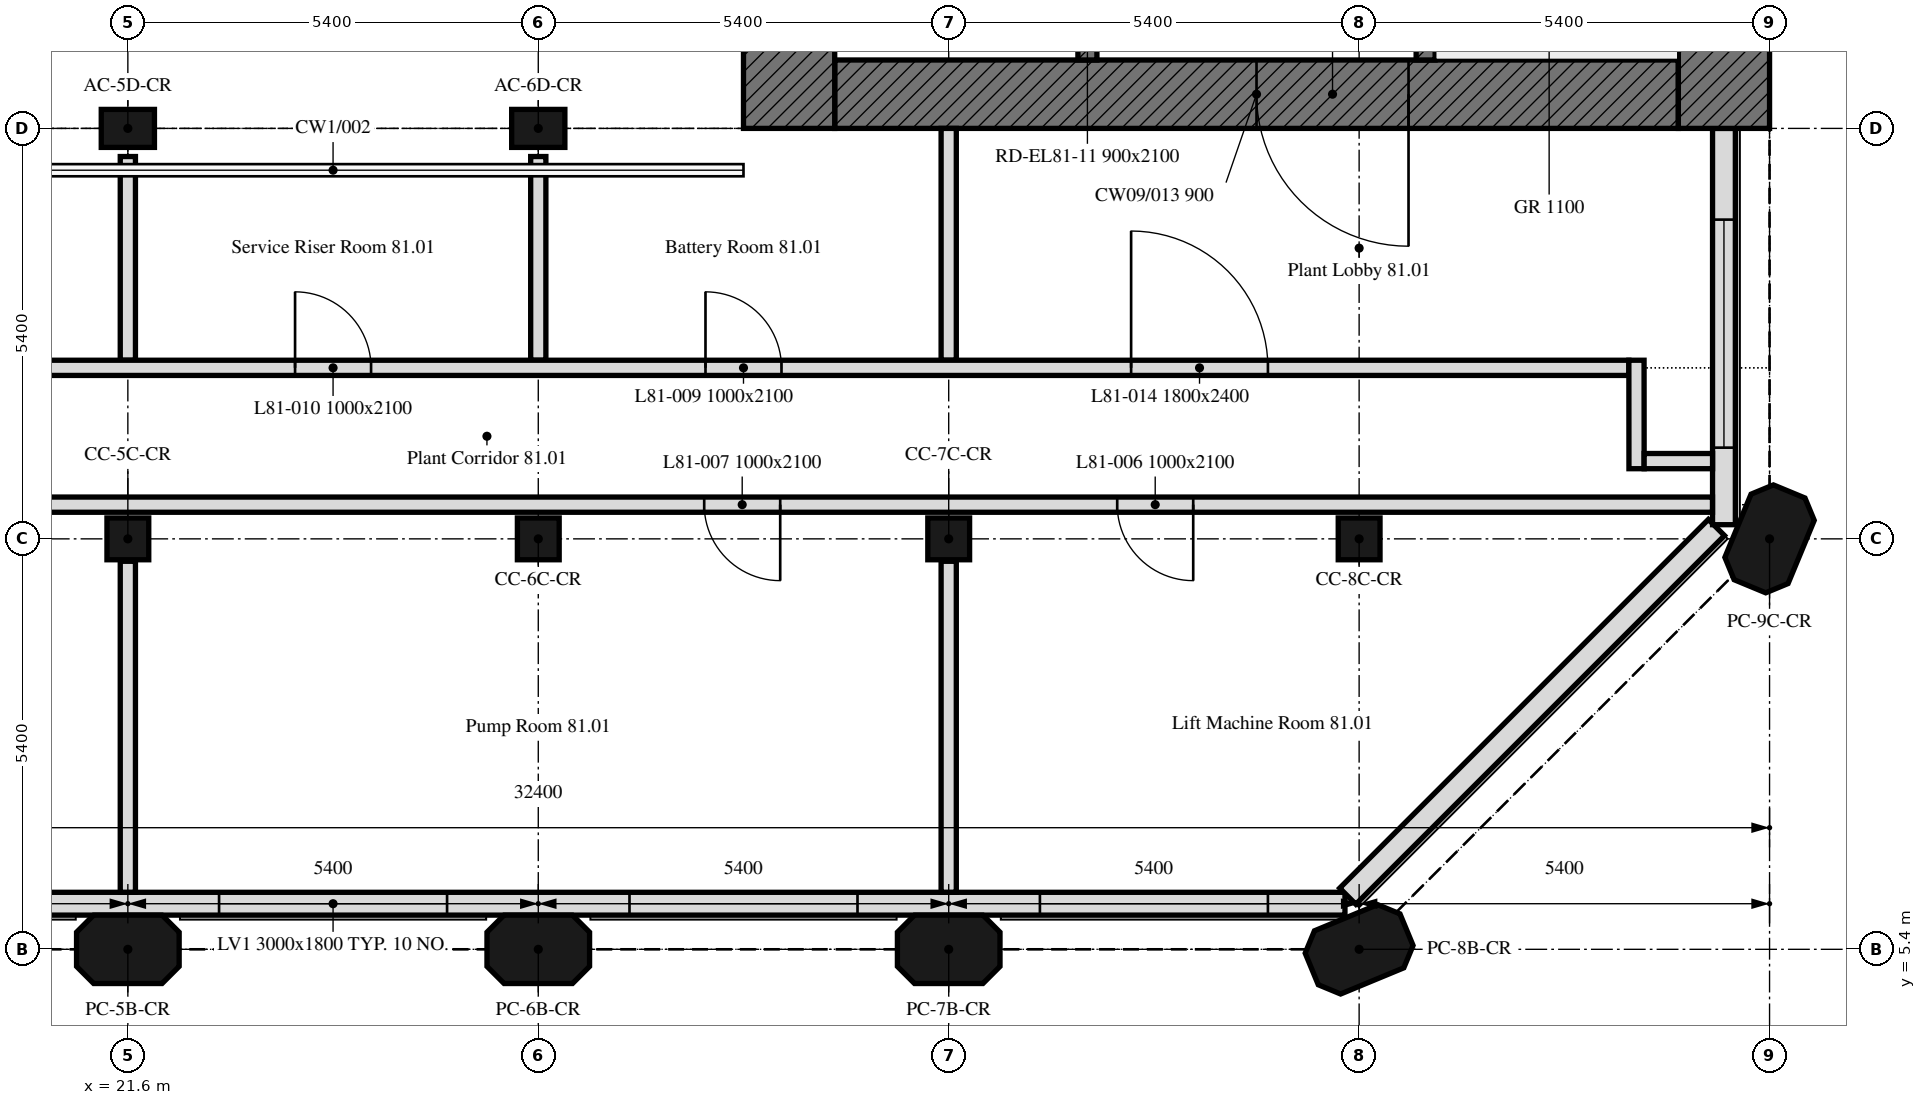
"""IFC4 building model, lengths in metres.
Left out: names, types, materials, properties, quantities, classifications, styles, units other than length and angle.
Written with IfcOpenShell. Run it as: python <this file> out.ifc"""

import sys

from ifc_helpers import new_model, si_unit, direction, frame, frame_2d, origin, origin_2d, place, context, subcontext, project, spatial, polyline, rectangle, outline, extrude, element, fill, save


model = new_model("IFC4")
c1 = context("Model", 3, precision=1e-05, world=origin(), true_north=direction((0.0, 1.0)))
c2 = subcontext(c1, "Body", "Model", "MODEL_VIEW")
j1 = project(units=[si_unit("LENGTHUNIT", "METRE"), si_unit("PLANEANGLEUNIT", "RADIAN")], contexts=[c1])
p1 = place(None, origin())
s1 = spatial("IfcSite", under=j1, at=p1, CompositionType="ELEMENT")
p2 = place(p1, origin())
s2 = spatial("IfcBuilding", under=s1, at=p2, CompositionType="ELEMENT")
p3 = place(p2, frame((0.0, 0.0, 326.2)))
s3 = spatial("IfcBuildingStorey", under=s2, at=p3, CompositionType="ELEMENT", Elevation=326.2)
for number, where, z_axis, x_axis in (
    (1, (21.6, 5.4, 0.0), (0.0, 0.0, 1.0), (1.0, 0.0, 0.0)),
    (2, (27.0, 5.4, 0.0), (0.0, 0.0, 1.0), (1.0, 0.0, 0.0)),
    (3, (32.4, 5.4, 0.0), (0.0, 0.0, 1.0), (1.0, 0.0, 0.0)),
    (4, (37.8, 5.4, 0.0), (0.0, 0.0, 1.0), (0.924, 0.383, 0.0)),
):
    element("IfcColumn", number, at=place(p3, frame(where, z_axis=z_axis, x_axis=x_axis)), inside=s3, PredefinedType="COLUMN", context=c2, shape_type="SweptSolid", body=[
        extrude(outline(polyline([(-0.45, -0.45), (0.45, -0.45), (0.675, -0.225), (0.675, 0.225), (0.45, 0.45), (-0.45, 0.45), (-0.675, 0.225), (-0.675, -0.225), (-0.45, -0.45)])), origin(), (0.0, 0.0, 1.0), 4.2),
    ])
for number, where, z_axis, x_axis in (
    (5, (21.6, 10.8, 0.0), (0.0, 0.0, 1.0), (1.0, 0.0, 0.0)),
    (6, (27.0, 10.8, 0.0), (0.0, 0.0, 1.0), (1.0, 0.0, 0.0)),
    (7, (32.4, 10.8, 0.0), (0.0, 0.0, 1.0), (1.0, 0.0, 0.0)),
    (8, (37.8, 10.8, 0.0), (0.0, 0.0, 1.0), (1.0, 0.0, 0.0)),
):
    element("IfcColumn", number, at=place(p3, frame(where, z_axis=z_axis, x_axis=x_axis)), inside=s3, PredefinedType="COLUMN", context=c2, shape_type="SweptSolid", body=[
        extrude(rectangle(XDim=0.55, YDim=0.55, at=origin_2d()), origin(), (0.0, 0.0, 1.0), 4.2),
    ])
p4 = place(p3, frame((43.2, 10.8, 0.0), z_axis=(0.0, 0.0, 1.0), x_axis=(0.382683432365, 0.923879532511, 0.0)))
e9 = element("IfcColumn", 9, at=p4, inside=s3, PredefinedType="COLUMN", context=c2, shape_type="SweptSolid", body=[
    extrude(outline(polyline([(-0.45, -0.45), (0.45, -0.45), (0.675, -0.225), (0.675, 0.225), (0.45, 0.45), (-0.45, 0.45), (-0.675, 0.225), (-0.675, -0.225), (-0.45, -0.45)])), origin(), (0.0, 0.0, 1.0), 4.2),
])
for number, where, z_axis, x_axis in (
    (10, (21.6, 16.2, 0.0), (0.0, 0.0, 1.0), (1.0, 0.0, 0.0)),
    (11, (27.0, 16.2, 0.0), (0.0, 0.0, 1.0), (1.0, 0.0, 0.0)),
):
    element("IfcColumn", number, at=place(p3, frame(where, z_axis=z_axis, x_axis=x_axis)), inside=s3, PredefinedType="COLUMN", context=c2, shape_type="SweptSolid", body=[
        extrude(rectangle(XDim=0.7, YDim=0.5, at=origin_2d()), origin(), (0.0, 0.0, 1.0), 4.2),
    ])
p5 = place(p3, frame((19.575, 6.0, 0.0), z_axis=(0.0, 0.0, 1.0), x_axis=(1.0, 0.0, 0.0)))
e12 = element("IfcWall", 12, at=p5, inside=s3, PredefinedType="SOLIDWALL", context=c2, shape_type="SweptSolid", body=[
    extrude(outline(polyline([(0.0, 0.0), (18.039, 0.0), (18.039, 4.2), (17.457, 4.2), (16.875, 4.2), (16.293, 4.2), (15.711, 4.2), (15.129, 4.2), (14.547, 4.2), (13.965, 4.2), (13.384, 4.2), (12.802, 4.2), (12.22, 4.2), (11.638, 4.2), (11.056, 4.2), (10.474, 4.2), (9.892, 4.2), (9.31, 4.2), (8.728, 4.2), (8.146, 4.2), (7.565, 4.2), (6.983, 4.2), (6.401, 4.2), (5.819, 4.2), (5.237, 4.2), (4.655, 4.2), (4.073, 4.2), (3.491, 4.2), (2.909, 4.2), (2.328, 4.2), (1.746, 4.2), (1.164, 4.2), (0.582, 4.2), (0.0, 4.2), (0.0, 0.0)])), frame((0.0, 0.15, 0.0), z_axis=(0.0, -1.0, 0.0), x_axis=(1.0, 0.0, 0.0)), (0.0, 0.0, 1.0), 0.3),
])
p6 = place(p5, frame((3.225, 0.0, 0.6)))
e13 = element("IfcOpeningElement", 13, at=p6, cuts=e12, PredefinedType="OPENING", context=c2, shape_type="SweptSolid", body=[
    extrude(rectangle(XDim=3.0, YDim=1.8, at=frame_2d((1.5, 0.9))), frame((0.0, 0.16, 0.0), z_axis=(0.0, -1.0, 0.0), x_axis=(1.0, 0.0, 0.0)), (0.0, 0.0, 1.0), 0.32),
])
p7 = place(p5, frame((8.625, 0.0, 0.6)))
e14 = element("IfcOpeningElement", 14, at=p7, cuts=e12, PredefinedType="OPENING", context=c2, shape_type="SweptSolid", body=[
    extrude(rectangle(XDim=3.0, YDim=1.8, at=frame_2d((1.5, 0.9))), frame((0.0, 0.16, 0.0), z_axis=(0.0, -1.0, 0.0), x_axis=(1.0, 0.0, 0.0)), (0.0, 0.0, 1.0), 0.32),
])
p8 = place(p5, frame((14.025, 0.0, 0.6)))
e15 = element("IfcOpeningElement", 15, at=p8, cuts=e12, PredefinedType="OPENING", context=c2, shape_type="SweptSolid", body=[
    extrude(rectangle(XDim=3.0, YDim=1.8, at=frame_2d((1.5, 0.9))), frame((0.0, 0.16, 0.0), z_axis=(0.0, -1.0, 0.0), x_axis=(1.0, 0.0, 0.0)), (0.0, 0.0, 1.0), 0.32),
])
p9 = place(p3, frame((37.65, 6.099, 0.0), z_axis=(0.0, 0.0, 1.0), x_axis=(0.707106781187, 0.707106781187, 0.0)))
e16 = element("IfcWall", 16, at=p9, inside=s3, PredefinedType="SOLIDWALL", context=c2, shape_type="SweptSolid", body=[
    extrude(outline(polyline([(0.0, 0.0), (6.86, 0.0), (6.86, 4.2), (6.288, 4.2), (5.716, 4.2), (5.145, 4.2), (4.573, 4.2), (4.001, 4.2), (3.43, 4.2), (2.858, 4.2), (2.287, 4.2), (1.715, 4.2), (1.143, 4.2), (0.572, 4.2), (0.0, 4.2), (0.0, 0.0)])), frame((0.0, 0.15, 0.0), z_axis=(0.0, -1.0, 0.0), x_axis=(1.0, 0.0, 0.0)), (0.0, 0.0, 1.0), 0.3),
])
p10 = place(p3, frame((42.6, 10.986, 0.0), z_axis=(0.0, 0.0, 1.0), x_axis=(0.0, 1.0, 0.0)))
e17 = element("IfcWall", 17, at=p10, inside=s3, PredefinedType="SOLIDWALL", context=c2, shape_type="SweptSolid", body=[
    extrude(outline(polyline([(0.0, 0.0), (5.214, 0.0), (5.214, 4.2), (4.634, 4.2), (4.055, 4.2), (3.476, 4.2), (2.896, 4.2), (2.317, 4.2), (1.738, 4.2), (1.159, 4.2), (0.579, 4.2), (0.0, 4.2), (0.0, 0.0)])), frame((0.0, 0.15, 0.0), z_axis=(0.0, -1.0, 0.0), x_axis=(1.0, 0.0, 0.0)), (0.0, 0.0, 1.0), 0.3),
])
p11 = place(p10, frame((1.014, 0.0, 0.6)))
e18 = element("IfcOpeningElement", 18, at=p11, cuts=e17, PredefinedType="OPENING", context=c2, shape_type="SweptSolid", body=[
    extrude(rectangle(XDim=3.0, YDim=1.8, at=frame_2d((1.5, 0.9))), frame((0.0, 0.16, 0.0), z_axis=(0.0, -1.0, 0.0), x_axis=(1.0, 0.0, 0.0)), (0.0, 0.0, 1.0), 0.32),
])
p12 = place(p3, frame((42.0, 16.65, 0.0), z_axis=(0.0, 0.0, 1.0), x_axis=(-1.0, 0.0, 0.0)))
e19 = element("IfcWall", 19, at=p12, inside=s3, PredefinedType="SOLIDWALL", context=c2, shape_type="SweptSolid", body=[
    extrude(rectangle(XDim=11.1, YDim=0.9, at=frame_2d((5.55, 0.0))), origin(), (0.0, 0.0, 1.0), 4.2),
])
p13 = place(p12, frame((3.55, 0.0, 0.0)))
e20 = element("IfcOpeningElement", 20, at=p13, cuts=e19, PredefinedType="OPENING", context=c2, shape_type="SweptSolid", body=[
    extrude(rectangle(XDim=2.0, YDim=2.4, at=frame_2d((1.0, 1.2))), frame((0.0, 0.45, 0.0), z_axis=(0.0, -1.0, 0.0), x_axis=(1.0, 0.0, 0.0)), (0.0, 0.0, 1.0), 0.9),
])
for number, where, z_axis, x_axis in (
    (21, (42.6, 32.4, 0.0), (0.0, 0.0, 1.0), (0.0, -1.0, 0.0)),
    (22, (30.3, 16.2, 0.0), (0.0, 0.0, 1.0), (0.0, 1.0, 0.0)),
):
    element("IfcWall", number, at=place(p3, frame(where, z_axis=z_axis, x_axis=x_axis)), inside=s3, PredefinedType="SOLIDWALL", context=c2, shape_type="SweptSolid", body=[
        extrude(rectangle(XDim=16.2, YDim=1.2, at=frame_2d((8.1, 0.0))), origin(), (0.0, 0.0, 1.0), 4.2),
    ])
p14 = place(p3, frame((38.675, 17.1, 0.0), z_axis=(0.0, 0.0, 1.0), x_axis=(0.0, 1.0, 0.0)))
e23 = element("IfcWall", 23, at=p14, inside=s3, PredefinedType="SOLIDWALL", context=c2, shape_type="SweptSolid", body=[
    extrude(rectangle(XDim=14.4, YDim=0.25, at=frame_2d((7.2, 0.0))), origin(), (0.0, 0.0, 1.0), 4.2),
])
p15 = place(p14, frame((4.6, 0.0, 0.0)))
e24 = element("IfcOpeningElement", 24, at=p15, cuts=e23, PredefinedType="OPENING", context=c2, shape_type="SweptSolid", body=[
    extrude(rectangle(XDim=1.0, YDim=2.1, at=frame_2d((0.5, 1.05))), frame((0.0, 0.125, 0.0), z_axis=(0.0, -1.0, 0.0), x_axis=(1.0, 0.0, 0.0)), (0.0, 0.0, 1.0), 0.25),
])
p16 = place(p14, frame((7.062, 0.0, 0.0)))
e25 = element("IfcOpeningElement", 25, at=p16, cuts=e23, PredefinedType="OPENING", context=c2, shape_type="SweptSolid", body=[
    extrude(rectangle(XDim=1.2, YDim=2.1, at=frame_2d((0.6, 1.05))), frame((0.0, 0.125, 0.0), z_axis=(0.0, -1.0, 0.0), x_axis=(1.0, 0.0, 0.0)), (0.0, 0.0, 1.0), 0.25),
])
p17 = place(p14, frame((10.106, 0.0, 0.0)))
e26 = element("IfcOpeningElement", 26, at=p17, cuts=e23, PredefinedType="OPENING", context=c2, shape_type="SweptSolid", body=[
    extrude(rectangle(XDim=0.9, YDim=2.1, at=frame_2d((0.45, 1.05))), frame((0.0, 0.125, 0.0), z_axis=(0.0, -1.0, 0.0), x_axis=(1.0, 0.0, 0.0)), (0.0, 0.0, 1.0), 0.25),
])
p18 = place(p14, frame((12.719, 0.0, 0.0)))
e27 = element("IfcOpeningElement", 27, at=p18, cuts=e23, PredefinedType="OPENING", context=c2, shape_type="SweptSolid", body=[
    extrude(rectangle(XDim=0.9, YDim=2.1, at=frame_2d((0.45, 1.05))), frame((0.0, 0.125, 0.0), z_axis=(0.0, -1.0, 0.0), x_axis=(1.0, 0.0, 0.0)), (0.0, 0.0, 1.0), 0.25),
])
p19 = place(p3, frame((34.225, 17.1, 0.0), z_axis=(0.0, 0.0, 1.0), x_axis=(0.0, 1.0, 0.0)))
e28 = element("IfcWall", 28, at=p19, inside=s3, PredefinedType="SOLIDWALL", context=c2, shape_type="SweptSolid", body=[
    extrude(rectangle(XDim=14.4, YDim=0.25, at=frame_2d((7.2, 0.0))), origin(), (0.0, 0.0, 1.0), 4.2),
])
p20 = place(p19, frame((13.15, 0.0, 0.0)))
e29 = element("IfcOpeningElement", 29, at=p20, cuts=e28, PredefinedType="OPENING", context=c2, shape_type="SweptSolid", body=[
    extrude(rectangle(XDim=1.0, YDim=2.1, at=frame_2d((0.5, 1.05))), frame((0.0, 0.125, 0.0), z_axis=(0.0, -1.0, 0.0), x_axis=(1.0, 0.0, 0.0)), (0.0, 0.0, 1.0), 0.25),
])
p21 = place(p19, frame((0.968, 0.0, 0.0)))
e30 = element("IfcOpeningElement", 30, at=p21, cuts=e28, PredefinedType="OPENING", context=c2, shape_type="SweptSolid", body=[
    extrude(rectangle(XDim=0.9, YDim=2.1, at=frame_2d((0.45, 1.05))), frame((0.0, 0.125, 0.0), z_axis=(0.0, -1.0, 0.0), x_axis=(1.0, 0.0, 0.0)), (0.0, 0.0, 1.0), 0.25),
])
p22 = place(p19, frame((3.468, 0.0, 0.0)))
e31 = element("IfcOpeningElement", 31, at=p22, cuts=e28, PredefinedType="OPENING", context=c2, shape_type="SweptSolid", body=[
    extrude(rectangle(XDim=0.9, YDim=2.1, at=frame_2d((0.45, 1.05))), frame((0.0, 0.125, 0.0), z_axis=(0.0, -1.0, 0.0), x_axis=(1.0, 0.0, 0.0)), (0.0, 0.0, 1.0), 0.25),
])
p23 = place(p19, frame((6.175, 0.0, 0.0)))
e32 = element("IfcOpeningElement", 32, at=p23, cuts=e28, PredefinedType="OPENING", context=c2, shape_type="SweptSolid", body=[
    extrude(rectangle(XDim=0.9, YDim=2.1, at=frame_2d((0.45, 1.05))), frame((0.0, 0.125, 0.0), z_axis=(0.0, -1.0, 0.0), x_axis=(1.0, 0.0, 0.0)), (0.0, 0.0, 1.0), 0.25),
])
for number, where, z_axis, x_axis in (
    (33, (32.4, 10.505, 0.0), (0.0, 0.0, 1.0), (0.0, -1.0, 0.0)),
    (34, (21.6, 10.505, 0.0), (0.0, 0.0, 1.0), (0.0, -1.0, 0.0)),
):
    element("IfcWall", number, at=place(p3, frame(where, z_axis=z_axis, x_axis=x_axis)), inside=s3, PredefinedType="PARTITIONING", context=c2, shape_type="SweptSolid", body=[
        extrude(rectangle(XDim=4.354, YDim=0.2, at=frame_2d((2.177, 0.0))), origin(), (0.0, 0.0, 1.0), 4.2),
    ])
p24 = place(p3, frame((42.449, 11.25, 0.0), z_axis=(0.0, 0.0, 1.0), x_axis=(-1.0, 0.0, 0.0)))
e35 = element("IfcWall", 35, at=p24, inside=s3, PredefinedType="PARTITIONING", context=c2, shape_type="SweptSolid", body=[
    extrude(rectangle(XDim=22.874, YDim=0.2, at=frame_2d((11.437, 0.0))), origin(), (0.0, 0.0, 1.0), 4.2),
])
p25 = place(p24, frame((6.832, 0.0, 0.0)))
e36 = element("IfcOpeningElement", 36, at=p25, cuts=e35, PredefinedType="OPENING", context=c2, shape_type="SweptSolid", body=[
    extrude(rectangle(XDim=1.0, YDim=2.1, at=frame_2d((0.5, 1.05))), frame((0.0, 0.1, 0.0), z_axis=(0.0, -1.0, 0.0), x_axis=(1.0, 0.0, 0.0)), (0.0, 0.0, 1.0), 0.2),
])
p26 = place(p24, frame((12.266, 0.0, 0.0)))
e37 = element("IfcOpeningElement", 37, at=p26, cuts=e35, PredefinedType="OPENING", context=c2, shape_type="SweptSolid", body=[
    extrude(rectangle(XDim=1.0, YDim=2.1, at=frame_2d((0.5, 1.05))), frame((0.0, 0.1, 0.0), z_axis=(0.0, -1.0, 0.0), x_axis=(1.0, 0.0, 0.0)), (0.0, 0.0, 1.0), 0.2),
])
p27 = place(p3, frame((27.0, 15.83, 0.0), z_axis=(0.0, 0.0, 1.0), x_axis=(0.0, -1.0, 0.0)))
e38 = element("IfcWall", 38, at=p27, inside=s3, PredefinedType="PARTITIONING", context=c2, shape_type="SweptSolid", body=[
    extrude(rectangle(XDim=2.68, YDim=0.2, at=frame_2d((1.34, 0.0))), origin(), (0.0, 0.0, 1.0), 4.2),
])
p28 = place(p3, frame((32.4, 13.15, 0.0), z_axis=(0.0, 0.0, 1.0), x_axis=(0.0, 1.0, 0.0)))
e39 = element("IfcWall", 39, at=p28, inside=s3, PredefinedType="PARTITIONING", context=c2, shape_type="SweptSolid", body=[
    extrude(rectangle(XDim=3.05, YDim=0.2, at=frame_2d((1.525, 0.0))), origin(), (0.0, 0.0, 1.0), 4.2),
])
p29 = place(p3, frame((21.6, 15.83, 0.0), z_axis=(0.0, 0.0, 1.0), x_axis=(0.0, -1.0, 0.0)))
e40 = element("IfcWall", 40, at=p29, inside=s3, PredefinedType="PARTITIONING", context=c2, shape_type="SweptSolid", body=[
    extrude(rectangle(XDim=2.68, YDim=0.2, at=frame_2d((1.34, 0.0))), origin(), (0.0, 0.0, 1.0), 4.2),
])
p30 = place(p3, frame((19.575, 13.05, 0.0), z_axis=(0.0, 0.0, 1.0), x_axis=(1.0, 0.0, 0.0)))
e41 = element("IfcWall", 41, at=p30, inside=s3, PredefinedType="PARTITIONING", context=c2, shape_type="SweptSolid", body=[
    extrude(rectangle(XDim=21.774, YDim=0.2, at=frame_2d((10.887, 0.0))), origin(), (0.0, 0.0, 1.0), 4.2),
])
p31 = place(p30, frame((9.625, 0.0, 0.0)))
e42 = element("IfcOpeningElement", 42, at=p31, cuts=e41, PredefinedType="OPENING", context=c2, shape_type="SweptSolid", body=[
    extrude(rectangle(XDim=1.0, YDim=2.1, at=frame_2d((0.5, 1.05))), frame((0.0, 0.1, 0.0), z_axis=(0.0, -1.0, 0.0), x_axis=(1.0, 0.0, 0.0)), (0.0, 0.0, 1.0), 0.2),
])
p32 = place(p30, frame((4.225, 0.0, 0.0)))
e43 = element("IfcOpeningElement", 43, at=p32, cuts=e41, PredefinedType="OPENING", context=c2, shape_type="SweptSolid", body=[
    extrude(rectangle(XDim=1.0, YDim=2.1, at=frame_2d((0.5, 1.05))), frame((0.0, 0.1, 0.0), z_axis=(0.0, -1.0, 0.0), x_axis=(1.0, 0.0, 0.0)), (0.0, 0.0, 1.0), 0.2),
])
p33 = place(p30, frame((15.225, 0.0, 0.0)))
e44 = element("IfcOpeningElement", 44, at=p33, cuts=e41, PredefinedType="OPENING", context=c2, shape_type="SweptSolid", body=[
    extrude(rectangle(XDim=1.8, YDim=2.4, at=frame_2d((0.9, 1.2))), frame((0.0, 0.1, 0.0), z_axis=(0.0, -1.0, 0.0), x_axis=(1.0, 0.0, 0.0)), (0.0, 0.0, 1.0), 0.2),
])
p34 = place(p3, frame((41.449, 13.15, 0.0), z_axis=(0.0, 0.0, 1.0), x_axis=(0.00085543168, -0.999999634118, 0.0)))
e45 = element("IfcWall", 45, at=p34, inside=s3, PredefinedType="PARTITIONING", context=c2, shape_type="SweptSolid", body=[
    extrude(rectangle(XDim=1.427, YDim=0.2, at=frame_2d((0.713, 0.0))), origin(), (0.0, 0.0, 1.0), 4.2),
])
p35 = place(p3, frame((41.55, 11.823, 0.0), z_axis=(0.0, 0.0, 1.0), x_axis=(1.0, 0.0, 0.0)))
e46 = element("IfcWall", 46, at=p35, inside=s3, PredefinedType="PARTITIONING", context=c2, shape_type="SweptSolid", body=[
    extrude(rectangle(XDim=0.9, YDim=0.2, at=frame_2d((0.45, 0.0))), origin(), (0.0, 0.0, 1.0), 4.2),
])
p36 = place(p6, origin())
e47 = element("IfcWindow", 47, at=p36, inside=s3, PartitioningType="SINGLE_PANEL", PredefinedType="WINDOW", context=c2, shape_type="SweptSolid", body=[
    extrude(rectangle(XDim=3.0, YDim=1.8, at=frame_2d((1.5, 0.9))), frame((0.0, 0.03, 0.0), z_axis=(0.0, -1.0, 0.0), x_axis=(1.0, 0.0, 0.0)), (0.0, 0.0, 1.0), 0.06),
])
fill(e13, e47)
p37 = place(p7, origin())
e48 = element("IfcWindow", 48, at=p37, inside=s3, PartitioningType="SINGLE_PANEL", PredefinedType="WINDOW", context=c2, shape_type="SweptSolid", body=[
    extrude(rectangle(XDim=3.0, YDim=1.8, at=frame_2d((1.5, 0.9))), frame((0.0, 0.03, 0.0), z_axis=(0.0, -1.0, 0.0), x_axis=(1.0, 0.0, 0.0)), (0.0, 0.0, 1.0), 0.06),
])
fill(e14, e48)
p38 = place(p8, origin())
e49 = element("IfcWindow", 49, at=p38, inside=s3, PartitioningType="SINGLE_PANEL", PredefinedType="WINDOW", context=c2, shape_type="SweptSolid", body=[
    extrude(rectangle(XDim=3.0, YDim=1.8, at=frame_2d((1.5, 0.9))), frame((0.0, 0.03, 0.0), z_axis=(0.0, -1.0, 0.0), x_axis=(1.0, 0.0, 0.0)), (0.0, 0.0, 1.0), 0.06),
])
fill(e15, e49)
p39 = place(p11, origin())
e50 = element("IfcWindow", 50, at=p39, inside=s3, PartitioningType="SINGLE_PANEL", PredefinedType="WINDOW", context=c2, shape_type="SweptSolid", body=[
    extrude(rectangle(XDim=3.0, YDim=1.8, at=frame_2d((1.5, 0.9))), frame((0.0, 0.03, 0.0), z_axis=(0.0, -1.0, 0.0), x_axis=(1.0, 0.0, 0.0)), (0.0, 0.0, 1.0), 0.06),
])
fill(e18, e50)
p40 = place(p13, origin())
e51 = element("IfcDoor", 51, at=p40, inside=s3, OperationType="DOUBLE_DOOR_SINGLE_SWING", PredefinedType="DOOR", context=c2, shape_type="SweptSolid", body=[
    extrude(rectangle(XDim=2.0, YDim=2.4, at=frame_2d((1.0, 1.2))), frame((0.0, 0.025, 0.0), z_axis=(0.0, -1.0, 0.0), x_axis=(1.0, 0.0, 0.0)), (0.0, 0.0, 1.0), 0.05),
])
fill(e20, e51)
p41 = place(p25, origin())
e52 = element("IfcDoor", 52, at=p41, inside=s3, OperationType="SINGLE_SWING_LEFT", PredefinedType="DOOR", context=c2, shape_type="SweptSolid", body=[
    extrude(rectangle(XDim=1.0, YDim=2.1, at=frame_2d((0.5, 1.05))), frame((0.0, 0.025, 0.0), z_axis=(0.0, -1.0, 0.0), x_axis=(1.0, 0.0, 0.0)), (0.0, 0.0, 1.0), 0.05),
])
fill(e36, e52)
p42 = place(p26, origin())
e53 = element("IfcDoor", 53, at=p42, inside=s3, OperationType="SINGLE_SWING_RIGHT", PredefinedType="DOOR", context=c2, shape_type="SweptSolid", body=[
    extrude(rectangle(XDim=1.0, YDim=2.1, at=frame_2d((0.5, 1.05))), frame((0.0, 0.025, 0.0), z_axis=(0.0, -1.0, 0.0), x_axis=(1.0, 0.0, 0.0)), (0.0, 0.0, 1.0), 0.05),
])
fill(e37, e53)
p43 = place(p31, origin())
e54 = element("IfcDoor", 54, at=p43, inside=s3, OperationType="SINGLE_SWING_LEFT", PredefinedType="DOOR", context=c2, shape_type="SweptSolid", body=[
    extrude(rectangle(XDim=1.0, YDim=2.1, at=frame_2d((0.5, 1.05))), frame((0.0, 0.025, 0.0), z_axis=(0.0, -1.0, 0.0), x_axis=(1.0, 0.0, 0.0)), (0.0, 0.0, 1.0), 0.05),
])
fill(e42, e54)
p44 = place(p32, origin())
e55 = element("IfcDoor", 55, at=p44, inside=s3, OperationType="SINGLE_SWING_RIGHT", PredefinedType="DOOR", context=c2, shape_type="SweptSolid", body=[
    extrude(rectangle(XDim=1.0, YDim=2.1, at=frame_2d((0.5, 1.05))), frame((0.0, 0.025, 0.0), z_axis=(0.0, -1.0, 0.0), x_axis=(1.0, 0.0, 0.0)), (0.0, 0.0, 1.0), 0.05),
])
fill(e43, e55)
p45 = place(p33, origin())
e56 = element("IfcDoor", 56, at=p45, inside=s3, OperationType="DOUBLE_DOOR_SINGLE_SWING", PredefinedType="DOOR", context=c2, shape_type="SweptSolid", body=[
    extrude(rectangle(XDim=1.8, YDim=2.4, at=frame_2d((0.9, 1.2))), frame((0.0, 0.025, 0.0), z_axis=(0.0, -1.0, 0.0), x_axis=(1.0, 0.0, 0.0)), (0.0, 0.0, 1.0), 0.05),
])
fill(e44, e56)
save(model, sys.argv[1])
